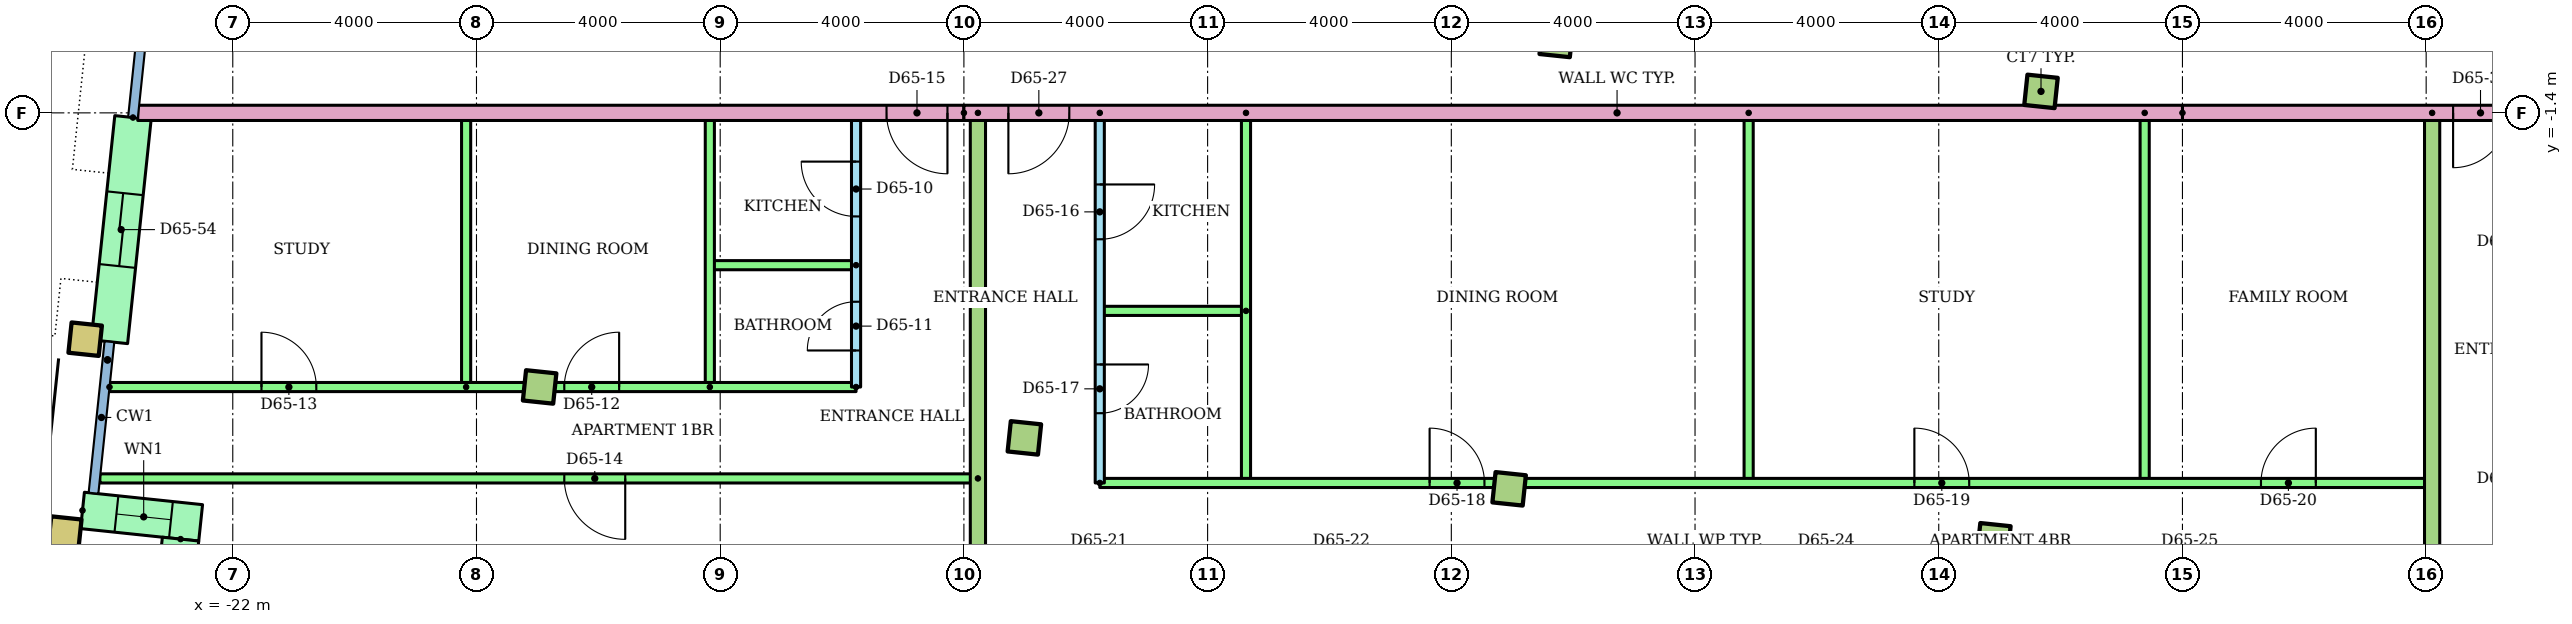
"""IFC4 building model, lengths in metres.
Left out: names, types, materials, properties, quantities, classifications, styles, units other than length and angle.
Written with IfcOpenShell. Run it as: python <this file> out.ifc"""

import sys

from ifc_helpers import new_model, si_unit, direction, frame, frame_2d, origin, origin_2d, place, context, subcontext, project, spatial, rectangle, hollow_rectangle, extrude, element, fill, save


model = new_model("IFC4")
c1 = context("Model", 3, precision=1e-05, world=origin(), true_north=direction((0.0, 1.0)))
c2 = subcontext(c1, "Body", "Model", "MODEL_VIEW")
j1 = project(units=[si_unit("LENGTHUNIT", "METRE"), si_unit("PLANEANGLEUNIT", "RADIAN")], contexts=[c1])
p1 = place(None, origin())
s1 = spatial("IfcSite", under=j1, at=p1, CompositionType="ELEMENT")
p2 = place(p1, origin())
s2 = spatial("IfcBuilding", under=s1, at=p2, CompositionType="ELEMENT")
p3 = place(p2, frame((0.0, 0.0, 253.1)))
s3 = spatial("IfcBuildingStorey", under=s2, at=p3, CompositionType="ELEMENT", Elevation=253.1)
for number, where, z_axis, x_axis in (
    (1, (-24.757, -8.297, 0.0), (0.0, 0.0, 1.0), (0.995, -0.105, 0.0)),
    (2, (-24.423, -5.115, 0.0), (0.0, 0.0, 1.0), (0.995, -0.105, 0.0)),
):
    element("IfcColumn", number, at=place(p3, frame(where, z_axis=z_axis, x_axis=x_axis)), inside=s3, PredefinedType="COLUMN", context=c2, shape_type="SweptSolid", body=[
        extrude(hollow_rectangle(XDim=0.5, YDim=0.5, WallThickness=0.025, at=origin_2d()), origin(), (0.0, 0.0, 1.0), 3.2),
    ])
for number, where, z_axis, x_axis in (
    (3, (-16.964, -5.898, 0.0), (0.0, 0.0, 1.0), (0.995, -0.105, 0.0)),
    (4, (-9.007, -6.735, 0.0), (0.0, 0.0, 1.0), (0.995, -0.105, 0.0)),
    (5, (-1.051, -7.571, 0.0), (0.0, 0.0, 1.0), (0.995, -0.105, 0.0)),
    (6, (6.905, -8.407, 0.0), (0.0, 0.0, 1.0), (0.995, -0.105, 0.0)),
    (7, (-0.278, -0.211, 0.0), (0.0, 0.0, 1.0), (0.995, -0.105, 0.0)),
    (8, (7.678, -1.048, 0.0), (0.0, 0.0, 1.0), (0.995, -0.105, 0.0)),
):
    element("IfcColumn", number, at=place(p3, frame(where, z_axis=z_axis, x_axis=x_axis)), inside=s3, PredefinedType="COLUMN", context=c2, shape_type="SweptSolid", body=[
        extrude(rectangle(XDim=0.5, YDim=0.5, at=origin_2d()), origin(), (0.0, 0.0, 1.0), 3.2),
    ])
p4 = place(p3, frame((-23.638, -1.476, 0.0), z_axis=(0.0, 0.0, 1.0), x_axis=(-0.104513052986, -0.994523514933, 0.0)))
e9 = element("IfcWall", 9, at=p4, inside=s3, PredefinedType="STANDARD", context=c2, shape_type="SweptSolid", body=[
    extrude(rectangle(XDim=3.7, YDim=0.6, at=frame_2d((1.85, 0.0))), origin(), (0.0, 0.0, 1.0), 2.92),
])
p5 = place(p4, frame((1.25, 0.0, 0.0)))
e10 = element("IfcOpeningElement", 10, at=p5, cuts=e9, PredefinedType="OPENING", context=c2, shape_type="SweptSolid", body=[
    extrude(rectangle(XDim=1.2, YDim=2.1, at=frame_2d((0.6, 1.05))), frame((0.0, 0.31, 0.0), z_axis=(0.0, -1.0, 0.0), x_axis=(1.0, 0.0, 0.0)), (0.0, 0.0, 1.0), 0.62),
])
p6 = place(p3, frame((-24.467, -7.925, 0.0), z_axis=(0.0, 0.0, 1.0), x_axis=(0.994521219184, -0.104534896528, 0.0)))
e11 = element("IfcWall", 11, at=p6, inside=s3, PredefinedType="STANDARD", context=c2, shape_type="SweptSolid", body=[
    extrude(rectangle(XDim=1.95, YDim=0.6, at=frame_2d((0.975, 0.0))), origin(), (0.0, 0.0, 1.0), 2.92),
])
p7 = place(p6, frame((0.56, 0.0, 0.9)))
e12 = element("IfcOpeningElement", 12, at=p7, cuts=e11, PredefinedType="OPENING", context=c2, shape_type="SweptSolid", body=[
    extrude(rectangle(XDim=0.9, YDim=1.5, at=frame_2d((0.45, 0.75))), frame((0.0, 0.31, 0.0), z_axis=(0.0, -1.0, 0.0), x_axis=(1.0, 0.0, 0.0)), (0.0, 0.0, 1.0), 0.62),
])
p8 = place(p3, frame((-22.857, -8.396, 0.0), z_axis=(0.0, 0.0, 1.0), x_axis=(-0.104444712852, -0.994530694326, 0.0)))
e13 = element("IfcWall", 13, at=p8, inside=s3, PredefinedType="STANDARD", context=c2, shape_type="SweptSolid", body=[
    extrude(rectangle(XDim=0.9, YDim=0.6, at=frame_2d((0.45, 0.0))), origin(), (0.0, 0.0, 1.0), 2.92),
])
p9 = place(p3, frame((-11.77, -5.9, 0.0), z_axis=(0.0, 0.0, 1.0), x_axis=(0.0, 1.0, 0.0)))
e14 = element("IfcWall", 14, at=p9, inside=s3, PredefinedType="PARTITIONING", context=c2, shape_type="SweptSolid", body=[
    extrude(rectangle(XDim=4.5, YDim=0.15, at=frame_2d((2.25, 0.0))), origin(), (0.0, 0.0, 1.0), 2.4),
])
p10 = place(p9, frame((2.8, 0.0, 0.0)))
e15 = element("IfcOpeningElement", 15, at=p10, cuts=e14, PredefinedType="OPENING", context=c2, shape_type="SweptSolid", body=[
    extrude(rectangle(XDim=0.9, YDim=2.1, at=frame_2d((0.45, 1.05))), frame((0.0, 0.085, 0.0), z_axis=(0.0, -1.0, 0.0), x_axis=(1.0, 0.0, 0.0)), (0.0, 0.0, 1.0), 0.17),
])
p11 = place(p9, frame((0.6, 0.0, 0.0)))
e16 = element("IfcOpeningElement", 16, at=p11, cuts=e14, PredefinedType="OPENING", context=c2, shape_type="SweptSolid", body=[
    extrude(rectangle(XDim=0.8, YDim=2.1, at=frame_2d((0.4, 1.05))), frame((0.0, 0.085, 0.0), z_axis=(0.0, -1.0, 0.0), x_axis=(1.0, 0.0, 0.0)), (0.0, 0.0, 1.0), 0.17),
])
p12 = place(p3, frame((-11.77, -3.9, 0.0), z_axis=(0.0, 0.0, 1.0), x_axis=(-1.0, 0.0, 0.0)))
e17 = element("IfcWall", 17, at=p12, inside=s3, PredefinedType="PARTITIONING", context=c2, shape_type="SweptSolid", body=[
    extrude(rectangle(XDim=2.4, YDim=0.15, at=frame_2d((1.2, 0.0))), origin(), (0.0, 0.0, 1.0), 2.4),
])
for number, where, z_axis, x_axis in (
    (18, (-14.17, -5.9, 0.0), (0.0, 0.0, 1.0), (0.0, 1.0, 0.0)),
    (19, (-18.17, -5.9, 0.0), (0.0, 0.0, 1.0), (0.0, 1.0, 0.0)),
):
    element("IfcWall", number, at=place(p3, frame(where, z_axis=z_axis, x_axis=x_axis)), inside=s3, PredefinedType="PARTITIONING", context=c2, shape_type="SweptSolid", body=[
        extrude(rectangle(XDim=4.5, YDim=0.15, at=frame_2d((2.25, 0.0))), origin(), (0.0, 0.0, 1.0), 2.4),
    ])
p13 = place(p3, frame((-24.023, -5.9, 0.0)))
e20 = element("IfcWall", 20, at=p13, inside=s3, PredefinedType="PARTITIONING", context=c2, shape_type="SweptSolid", body=[
    extrude(rectangle(XDim=12.253, YDim=0.15, at=frame_2d((6.127, 0.0))), origin(), (0.0, 0.0, 1.0), 2.4),
])
p14 = place(p13, frame((7.465, 0.0, 0.0)))
e21 = element("IfcOpeningElement", 21, at=p14, cuts=e20, PredefinedType="OPENING", context=c2, shape_type="SweptSolid", body=[
    extrude(rectangle(XDim=0.9, YDim=2.1, at=frame_2d((0.45, 1.05))), frame((0.0, 0.085, 0.0), z_axis=(0.0, -1.0, 0.0), x_axis=(1.0, 0.0, 0.0)), (0.0, 0.0, 1.0), 0.17),
])
p15 = place(p13, frame((2.494, 0.0, 0.0)))
e22 = element("IfcOpeningElement", 22, at=p15, cuts=e20, PredefinedType="OPENING", context=c2, shape_type="SweptSolid", body=[
    extrude(rectangle(XDim=0.9, YDim=2.1, at=frame_2d((0.45, 1.05))), frame((0.0, 0.085, 0.0), z_axis=(0.0, -1.0, 0.0), x_axis=(1.0, 0.0, 0.0)), (0.0, 0.0, 1.0), 0.17),
])
p16 = place(p3, frame((-9.77, -7.4, 0.0), z_axis=(0.0, 0.0, 1.0), x_axis=(-1.0, 0.0, 0.0)))
e23 = element("IfcWall", 23, at=p16, inside=s3, PredefinedType="PARTITIONING", context=c2, shape_type="SweptSolid", body=[
    extrude(rectangle(XDim=14.411, YDim=0.15, at=frame_2d((7.206, 0.0))), origin(), (0.0, 0.0, 1.0), 2.4),
])
p17 = place(p16, frame((5.789, 0.0, 0.0)))
e24 = element("IfcOpeningElement", 24, at=p17, cuts=e23, PredefinedType="OPENING", context=c2, shape_type="SweptSolid", body=[
    extrude(rectangle(XDim=1.0, YDim=2.1, at=frame_2d((0.5, 1.05))), frame((0.0, 0.085, 0.0), z_axis=(0.0, -1.0, 0.0), x_axis=(1.0, 0.0, 0.0)), (0.0, 0.0, 1.0), 0.17),
])
p18 = place(p3, frame((-7.77, -1.4, 0.0), z_axis=(0.0, 0.0, 1.0), x_axis=(0.0, -1.0, 0.0)))
e25 = element("IfcWall", 25, at=p18, inside=s3, PredefinedType="PARTITIONING", context=c2, shape_type="SweptSolid", body=[
    extrude(rectangle(XDim=6.075, YDim=0.15, at=frame_2d((3.037, 0.0))), origin(), (0.0, 0.0, 1.0), 2.4),
])
p19 = place(p18, frame((1.175, 0.0, 0.0)))
e26 = element("IfcOpeningElement", 26, at=p19, cuts=e25, PredefinedType="OPENING", context=c2, shape_type="SweptSolid", body=[
    extrude(rectangle(XDim=0.9, YDim=2.1, at=frame_2d((0.45, 1.05))), frame((0.0, 0.085, 0.0), z_axis=(0.0, -1.0, 0.0), x_axis=(1.0, 0.0, 0.0)), (0.0, 0.0, 1.0), 0.17),
])
p20 = place(p18, frame((4.13, 0.0, 0.0)))
e27 = element("IfcOpeningElement", 27, at=p20, cuts=e25, PredefinedType="OPENING", context=c2, shape_type="SweptSolid", body=[
    extrude(rectangle(XDim=0.8, YDim=2.1, at=frame_2d((0.4, 1.05))), frame((0.0, 0.085, 0.0), z_axis=(0.0, -1.0, 0.0), x_axis=(1.0, 0.0, 0.0)), (0.0, 0.0, 1.0), 0.17),
])
p21 = place(p3, frame((-5.37, -4.65, 0.0), z_axis=(0.0, 0.0, 1.0), x_axis=(-1.0, 0.0, 0.0)))
e28 = element("IfcWall", 28, at=p21, inside=s3, PredefinedType="PARTITIONING", context=c2, shape_type="SweptSolid", body=[
    extrude(rectangle(XDim=2.4, YDim=0.15, at=frame_2d((1.2, 0.0))), origin(), (0.0, 0.0, 1.0), 2.4),
])
for number, where, z_axis, x_axis in (
    (29, (-5.37, -1.4, 0.0), (0.0, 0.0, 1.0), (0.0, -1.0, 0.0)),
    (30, (2.88, -1.4, 0.0), (0.0, 0.0, 1.0), (0.0, -1.0, 0.0)),
    (31, (9.38, -1.4, 0.0), (0.0, 0.0, 1.0), (0.0, -1.0, 0.0)),
):
    element("IfcWall", number, at=place(p3, frame(where, z_axis=z_axis, x_axis=x_axis)), inside=s3, PredefinedType="PARTITIONING", context=c2, shape_type="SweptSolid", body=[
        extrude(rectangle(XDim=6.075, YDim=0.15, at=frame_2d((3.037, 0.0))), origin(), (0.0, 0.0, 1.0), 2.4),
    ])
p22 = place(p3, frame((-7.77, -7.475, 0.0)))
e32 = element("IfcWall", 32, at=p22, inside=s3, PredefinedType="PARTITIONING", context=c2, shape_type="SweptSolid", body=[
    extrude(rectangle(XDim=21.868, YDim=0.15, at=frame_2d((10.934, 0.0))), origin(), (0.0, 0.0, 1.0), 2.4),
])
p23 = place(p22, frame((5.414, 0.0, 0.0)))
e33 = element("IfcOpeningElement", 33, at=p23, cuts=e32, PredefinedType="OPENING", context=c2, shape_type="SweptSolid", body=[
    extrude(rectangle(XDim=0.9, YDim=2.1, at=frame_2d((0.45, 1.05))), frame((0.0, 0.085, 0.0), z_axis=(0.0, -1.0, 0.0), x_axis=(1.0, 0.0, 0.0)), (0.0, 0.0, 1.0), 0.17),
])
p24 = place(p22, frame((13.37, 0.0, 0.0)))
e34 = element("IfcOpeningElement", 34, at=p24, cuts=e32, PredefinedType="OPENING", context=c2, shape_type="SweptSolid", body=[
    extrude(rectangle(XDim=0.9, YDim=2.1, at=frame_2d((0.45, 1.05))), frame((0.0, 0.085, 0.0), z_axis=(0.0, -1.0, 0.0), x_axis=(1.0, 0.0, 0.0)), (0.0, 0.0, 1.0), 0.17),
])
p25 = place(p22, frame((19.059, 0.0, 0.0)))
e35 = element("IfcOpeningElement", 35, at=p25, cuts=e32, PredefinedType="OPENING", context=c2, shape_type="SweptSolid", body=[
    extrude(rectangle(XDim=0.9, YDim=2.1, at=frame_2d((0.45, 1.05))), frame((0.0, 0.085, 0.0), z_axis=(0.0, -1.0, 0.0), x_axis=(1.0, 0.0, 0.0)), (0.0, 0.0, 1.0), 0.17),
])
p26 = place(p3, frame((-9.77, -1.4, 0.0), z_axis=(0.0, 0.0, 1.0), x_axis=(0.0, -1.0, 0.0)))
e36 = element("IfcWall", 36, at=p26, inside=s3, PredefinedType="PARTITIONING", context=c2, shape_type="SweptSolid", body=[
    extrude(rectangle(XDim=12.504, YDim=0.25, at=frame_2d((6.252, 0.0))), origin(), (0.0, 0.0, 1.0), 2.4),
])
p27 = place(p3, frame((14.098, -1.4, 0.0), z_axis=(0.0, 0.0, 1.0), x_axis=(0.0, -1.0, 0.0)))
e37 = element("IfcWall", 37, at=p27, inside=s3, PredefinedType="PARTITIONING", context=c2, shape_type="SweptSolid", body=[
    extrude(rectangle(XDim=15.013, YDim=0.25, at=frame_2d((7.506, 0.0))), origin(), (0.0, 0.0, 1.0), 2.4),
])
p28 = place(p3, frame((-10.0, -1.4, 0.0), z_axis=(0.0, 0.0, 1.0), x_axis=(-1.0, 0.0, 0.0)))
e38 = element("IfcWall", 38, at=p28, inside=s3, PredefinedType="PARTITIONING", context=c2, shape_type="SweptSolid", body=[
    extrude(rectangle(XDim=13.56, YDim=0.25, at=frame_2d((6.78, 0.0))), origin(), (0.0, 0.0, 1.0), 2.4),
])
p29 = place(p28, frame((0.27, 0.0, 0.0)))
e39 = element("IfcOpeningElement", 39, at=p29, cuts=e38, PredefinedType="OPENING", context=c2, shape_type="SweptSolid", body=[
    extrude(rectangle(XDim=1.0, YDim=2.1, at=frame_2d((0.5, 1.05))), frame((0.0, 0.135, 0.0), z_axis=(0.0, -1.0, 0.0), x_axis=(1.0, 0.0, 0.0)), (0.0, 0.0, 1.0), 0.27),
])
p30 = place(p3, frame((25.0, -1.4, 0.0), z_axis=(0.0, 0.0, 1.0), x_axis=(-1.0, 0.0, 0.0)))
e40 = element("IfcWall", 40, at=p30, inside=s3, PredefinedType="PARTITIONING", context=c2, shape_type="SweptSolid", body=[
    extrude(rectangle(XDim=15.0, YDim=0.25, at=frame_2d((7.5, 0.0))), origin(), (0.0, 0.0, 1.0), 2.4),
])
p31 = place(p30, frame((9.658, 0.0, 0.0)))
e41 = element("IfcOpeningElement", 41, at=p31, cuts=e40, PredefinedType="OPENING", context=c2, shape_type="SweptSolid", body=[
    extrude(rectangle(XDim=0.9, YDim=2.1, at=frame_2d((0.45, 1.05))), frame((0.0, 0.135, 0.0), z_axis=(0.0, -1.0, 0.0), x_axis=(1.0, 0.0, 0.0)), (0.0, 0.0, 1.0), 0.27),
])
p32 = place(p3, frame((10.0, -1.4, 0.0), z_axis=(0.0, 0.0, 1.0), x_axis=(-1.0, 0.0, 0.0)))
e42 = element("IfcWall", 42, at=p32, inside=s3, PredefinedType="PARTITIONING", context=c2, shape_type="SweptSolid", body=[
    extrude(rectangle(XDim=20.0, YDim=0.25, at=frame_2d((10.0, 0.0))), origin(), (0.0, 0.0, 1.0), 2.4),
])
p33 = place(p32, frame((18.27, 0.0, 0.0)))
e43 = element("IfcOpeningElement", 43, at=p33, cuts=e42, PredefinedType="OPENING", context=c2, shape_type="SweptSolid", body=[
    extrude(rectangle(XDim=1.0, YDim=2.1, at=frame_2d((0.5, 1.05))), frame((0.0, 0.135, 0.0), z_axis=(0.0, -1.0, 0.0), x_axis=(1.0, 0.0, 0.0)), (0.0, 0.0, 1.0), 0.27),
])
p34 = place(p7, origin())
e44 = element("IfcWindow", 44, at=p34, inside=s3, PartitioningType="SINGLE_PANEL", PredefinedType="WINDOW", context=c2, shape_type="SweptSolid", body=[
    extrude(rectangle(XDim=0.9, YDim=1.5, at=frame_2d((0.45, 0.75))), frame((0.0, 0.03, 0.0), z_axis=(0.0, -1.0, 0.0), x_axis=(1.0, 0.0, 0.0)), (0.0, 0.0, 1.0), 0.06),
])
fill(e12, e44)
p35 = place(p10, origin())
e45 = element("IfcDoor", 45, at=p35, inside=s3, OperationType="SINGLE_SWING_RIGHT", PredefinedType="DOOR", context=c2, shape_type="SweptSolid", body=[
    extrude(rectangle(XDim=0.9, YDim=2.1, at=frame_2d((0.45, 1.05))), frame((0.0, 0.025, 0.0), z_axis=(0.0, -1.0, 0.0), x_axis=(1.0, 0.0, 0.0)), (0.0, 0.0, 1.0), 0.05),
])
fill(e15, e45)
p36 = place(p11, origin())
e46 = element("IfcDoor", 46, at=p36, inside=s3, OperationType="SINGLE_SWING_LEFT", PredefinedType="DOOR", context=c2, shape_type="SweptSolid", body=[
    extrude(rectangle(XDim=0.8, YDim=2.1, at=frame_2d((0.4, 1.05))), frame((0.0, 0.025, 0.0), z_axis=(0.0, -1.0, 0.0), x_axis=(1.0, 0.0, 0.0)), (0.0, 0.0, 1.0), 0.05),
])
fill(e16, e46)
p37 = place(p14, origin())
e47 = element("IfcDoor", 47, at=p37, inside=s3, OperationType="SINGLE_SWING_RIGHT", PredefinedType="DOOR", context=c2, shape_type="SweptSolid", body=[
    extrude(rectangle(XDim=0.9, YDim=2.1, at=frame_2d((0.45, 1.05))), frame((0.0, 0.025, 0.0), z_axis=(0.0, -1.0, 0.0), x_axis=(1.0, 0.0, 0.0)), (0.0, 0.0, 1.0), 0.05),
])
fill(e21, e47)
p38 = place(p15, origin())
e48 = element("IfcDoor", 48, at=p38, inside=s3, OperationType="SINGLE_SWING_LEFT", PredefinedType="DOOR", context=c2, shape_type="SweptSolid", body=[
    extrude(rectangle(XDim=0.9, YDim=2.1, at=frame_2d((0.45, 1.05))), frame((0.0, 0.025, 0.0), z_axis=(0.0, -1.0, 0.0), x_axis=(1.0, 0.0, 0.0)), (0.0, 0.0, 1.0), 0.05),
])
fill(e22, e48)
p39 = place(p17, origin())
e49 = element("IfcDoor", 49, at=p39, inside=s3, OperationType="SINGLE_SWING_LEFT", PredefinedType="DOOR", context=c2, shape_type="SweptSolid", body=[
    extrude(rectangle(XDim=1.0, YDim=2.1, at=frame_2d((0.5, 1.05))), frame((0.0, 0.025, 0.0), z_axis=(0.0, -1.0, 0.0), x_axis=(1.0, 0.0, 0.0)), (0.0, 0.0, 1.0), 0.05),
])
fill(e24, e49)
p40 = place(p29, origin())
e50 = element("IfcDoor", 50, at=p40, inside=s3, OperationType="SINGLE_SWING_LEFT", PredefinedType="DOOR", context=c2, shape_type="SweptSolid", body=[
    extrude(rectangle(XDim=1.0, YDim=2.1, at=frame_2d((0.5, 1.05))), frame((0.0, 0.025, 0.0), z_axis=(0.0, -1.0, 0.0), x_axis=(1.0, 0.0, 0.0)), (0.0, 0.0, 1.0), 0.05),
])
fill(e39, e50)
p41 = place(p19, origin())
e51 = element("IfcDoor", 51, at=p41, inside=s3, OperationType="SINGLE_SWING_LEFT", PredefinedType="DOOR", context=c2, shape_type="SweptSolid", body=[
    extrude(rectangle(XDim=0.9, YDim=2.1, at=frame_2d((0.45, 1.05))), frame((0.0, 0.025, 0.0), z_axis=(0.0, -1.0, 0.0), x_axis=(1.0, 0.0, 0.0)), (0.0, 0.0, 1.0), 0.05),
])
fill(e26, e51)
p42 = place(p20, origin())
e52 = element("IfcDoor", 52, at=p42, inside=s3, OperationType="SINGLE_SWING_LEFT", PredefinedType="DOOR", context=c2, shape_type="SweptSolid", body=[
    extrude(rectangle(XDim=0.8, YDim=2.1, at=frame_2d((0.4, 1.05))), frame((0.0, 0.025, 0.0), z_axis=(0.0, -1.0, 0.0), x_axis=(1.0, 0.0, 0.0)), (0.0, 0.0, 1.0), 0.05),
])
fill(e27, e52)
p43 = place(p23, origin())
e53 = element("IfcDoor", 53, at=p43, inside=s3, OperationType="SINGLE_SWING_LEFT", PredefinedType="DOOR", context=c2, shape_type="SweptSolid", body=[
    extrude(rectangle(XDim=0.9, YDim=2.1, at=frame_2d((0.45, 1.05))), frame((0.0, 0.025, 0.0), z_axis=(0.0, -1.0, 0.0), x_axis=(1.0, 0.0, 0.0)), (0.0, 0.0, 1.0), 0.05),
])
fill(e33, e53)
p44 = place(p24, origin())
e54 = element("IfcDoor", 54, at=p44, inside=s3, OperationType="SINGLE_SWING_LEFT", PredefinedType="DOOR", context=c2, shape_type="SweptSolid", body=[
    extrude(rectangle(XDim=0.9, YDim=2.1, at=frame_2d((0.45, 1.05))), frame((0.0, 0.025, 0.0), z_axis=(0.0, -1.0, 0.0), x_axis=(1.0, 0.0, 0.0)), (0.0, 0.0, 1.0), 0.05),
])
fill(e34, e54)
p45 = place(p25, origin())
e55 = element("IfcDoor", 55, at=p45, inside=s3, OperationType="SINGLE_SWING_RIGHT", PredefinedType="DOOR", context=c2, shape_type="SweptSolid", body=[
    extrude(rectangle(XDim=0.9, YDim=2.1, at=frame_2d((0.45, 1.05))), frame((0.0, 0.025, 0.0), z_axis=(0.0, -1.0, 0.0), x_axis=(1.0, 0.0, 0.0)), (0.0, 0.0, 1.0), 0.05),
])
fill(e35, e55)
p46 = place(p33, origin())
e56 = element("IfcDoor", 56, at=p46, inside=s3, OperationType="SINGLE_SWING_RIGHT", PredefinedType="DOOR", context=c2, shape_type="SweptSolid", body=[
    extrude(rectangle(XDim=1.0, YDim=2.1, at=frame_2d((0.5, 1.05))), frame((0.0, 0.025, 0.0), z_axis=(0.0, -1.0, 0.0), x_axis=(1.0, 0.0, 0.0)), (0.0, 0.0, 1.0), 0.05),
])
fill(e43, e56)
p47 = place(p31, origin())
e57 = element("IfcDoor", 57, at=p47, inside=s3, OperationType="SINGLE_SWING_RIGHT", PredefinedType="DOOR", context=c2, shape_type="SweptSolid", body=[
    extrude(rectangle(XDim=0.9, YDim=2.1, at=frame_2d((0.45, 1.05))), frame((0.0, 0.025, 0.0), z_axis=(0.0, -1.0, 0.0), x_axis=(1.0, 0.0, 0.0)), (0.0, 0.0, 1.0), 0.05),
])
fill(e41, e57)
p48 = place(p5, origin())
e58 = element("IfcDoor", 58, at=p48, inside=s3, OperationType="SLIDING_TO_LEFT", PredefinedType="DOOR", context=c2, shape_type="SweptSolid", body=[
    extrude(rectangle(XDim=1.2, YDim=2.1, at=frame_2d((0.6, 1.05))), frame((0.0, 0.025, 0.0), z_axis=(0.0, -1.0, 0.0), x_axis=(1.0, 0.0, 0.0)), (0.0, 0.0, 1.0), 0.05),
])
fill(e10, e58)
save(model, sys.argv[1])
